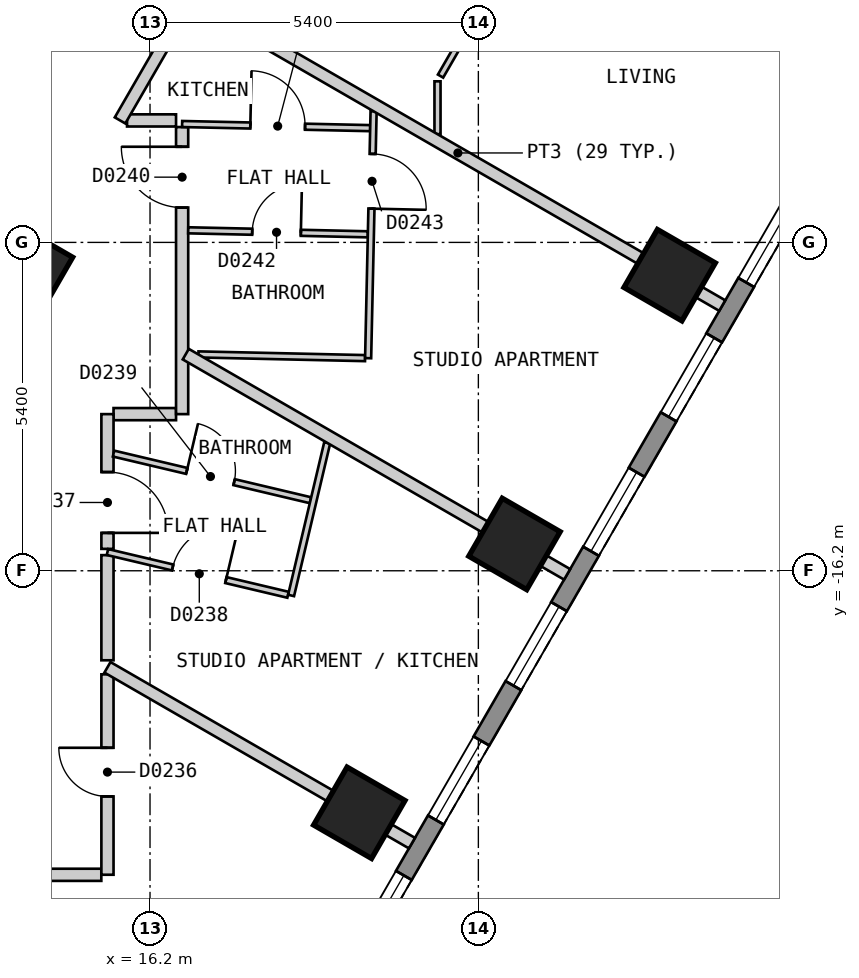
"""IFC4 building model, lengths in metres.
Left out: names, types, materials, properties, quantities, classifications, styles, units other than length and angle.
Written with IfcOpenShell. Run it as: python <this file> out.ifc"""

import sys

from ifc_helpers import new_model, si_unit, direction, frame, frame_2d, origin, origin_2d, place, context, subcontext, project, spatial, polyline, rectangle, outline, extrude, element, fill, save


model = new_model("IFC4")
c1 = context("Model", 3, precision=1e-05, world=origin(), true_north=direction((0.0, 1.0)))
c2 = subcontext(c1, "Body", "Model", "MODEL_VIEW")
j1 = project(units=[si_unit("LENGTHUNIT", "METRE"), si_unit("PLANEANGLEUNIT", "RADIAN")], contexts=[c1])
p1 = place(None, origin())
s1 = spatial("IfcSite", under=j1, at=p1, CompositionType="ELEMENT")
p2 = place(p1, origin())
s2 = spatial("IfcBuilding", under=s1, at=p2, CompositionType="ELEMENT")
p3 = place(p2, frame((0.0, 0.0, 41.4)))
s3 = spatial("IfcBuildingStorey", under=s2, at=p3, CompositionType="ELEMENT", Elevation=41.4)
for number, where, z_axis, x_axis in (
    (1, (19.642, -20.18, 0.0), (0.0, 0.0, 1.0), (0.5, 0.866, 0.0)),
    (2, (22.194, -15.759, 0.0), (0.0, 0.0, 1.0), (0.5, 0.866, 0.0)),
    (3, (24.746, -11.339, 0.0), (0.0, 0.0, 1.0), (0.5, 0.866, 0.0)),
):
    element("IfcColumn", number, at=place(p3, frame(where, z_axis=z_axis, x_axis=x_axis)), inside=s3, PredefinedType="COLUMN", context=c2, shape_type="SweptSolid", body=[
        extrude(rectangle(XDim=1.1, YDim=1.1, at=origin_2d()), origin(), (0.0, 0.0, 1.0), 3.0),
    ])
p4 = place(p3, frame((14.313, -11.209, 0.0), z_axis=(0.0, 0.0, 1.0), x_axis=(0.499984884929, 0.866034130299, 0.0)))
e4 = element("IfcColumn", 4, at=p4, inside=s3, PredefinedType="COLUMN", context=c2, shape_type="SweptSolid", body=[
    extrude(rectangle(XDim=0.9, YDim=0.9, at=origin_2d()), origin(), (0.0, 0.0, 1.0), 3.0),
])
p5 = place(p3, frame((17.71, -25.825, 0.0), z_axis=(0.0, 0.0, 1.0), x_axis=(0.500001938803, 0.866024284413, 0.0)))
e5 = element("IfcWall", 5, at=p5, inside=s3, PredefinedType="SOLIDWALL", context=c2, shape_type="SweptSolid", body=[
    extrude(outline(polyline([(0.0, -0.15), (27.02, -0.15), (26.94, 0.15), (0.08, 0.15), (0.0, -0.15)])), origin(), (0.0, 0.0, 1.0), 2.7),
])
p6 = place(p5, frame((1.277, 0.0, 0.15)))
e6 = element("IfcOpeningElement", 6, at=p6, cuts=e5, PredefinedType="OPENING", context=c2, shape_type="SweptSolid", body=[
    extrude(rectangle(XDim=1.5, YDim=2.1, at=frame_2d((0.75, 1.05))), frame((0.0, 0.16, 0.0), z_axis=(0.0, -1.0, 0.0), x_axis=(1.0, 0.0, 0.0)), (0.0, 0.0, 1.0), 0.32),
])
p7 = place(p5, frame((3.829, 0.0, 0.15)))
e7 = element("IfcOpeningElement", 7, at=p7, cuts=e5, PredefinedType="OPENING", context=c2, shape_type="SweptSolid", body=[
    extrude(rectangle(XDim=1.5, YDim=2.1, at=frame_2d((0.75, 1.05))), frame((0.0, 0.16, 0.0), z_axis=(0.0, -1.0, 0.0), x_axis=(1.0, 0.0, 0.0)), (0.0, 0.0, 1.0), 0.32),
])
p8 = place(p5, frame((6.382, 0.0, 0.15)))
e8 = element("IfcOpeningElement", 8, at=p8, cuts=e5, PredefinedType="OPENING", context=c2, shape_type="SweptSolid", body=[
    extrude(rectangle(XDim=1.5, YDim=2.1, at=frame_2d((0.75, 1.05))), frame((0.0, 0.16, 0.0), z_axis=(0.0, -1.0, 0.0), x_axis=(1.0, 0.0, 0.0)), (0.0, 0.0, 1.0), 0.32),
])
p9 = place(p5, frame((8.933, 0.0, 0.15)))
e9 = element("IfcOpeningElement", 9, at=p9, cuts=e5, PredefinedType="OPENING", context=c2, shape_type="SweptSolid", body=[
    extrude(rectangle(XDim=1.5, YDim=2.1, at=frame_2d((0.75, 1.05))), frame((0.0, 0.16, 0.0), z_axis=(0.0, -1.0, 0.0), x_axis=(1.0, 0.0, 0.0)), (0.0, 0.0, 1.0), 0.32),
])
p10 = place(p5, frame((11.485, 0.0, 0.15)))
e10 = element("IfcOpeningElement", 10, at=p10, cuts=e5, PredefinedType="OPENING", context=c2, shape_type="SweptSolid", body=[
    extrude(rectangle(XDim=1.5, YDim=2.1, at=frame_2d((0.75, 1.05))), frame((0.0, 0.16, 0.0), z_axis=(0.0, -1.0, 0.0), x_axis=(1.0, 0.0, 0.0)), (0.0, 0.0, 1.0), 0.32),
])
p11 = place(p5, frame((14.037, 0.0, 0.15)))
e11 = element("IfcOpeningElement", 11, at=p11, cuts=e5, PredefinedType="OPENING", context=c2, shape_type="SweptSolid", body=[
    extrude(rectangle(XDim=1.5, YDim=2.1, at=frame_2d((0.75, 1.05))), frame((0.0, 0.16, 0.0), z_axis=(0.0, -1.0, 0.0), x_axis=(1.0, 0.0, 0.0)), (0.0, 0.0, 1.0), 0.32),
])
p12 = place(p5, frame((16.589, 0.0, 0.15)))
e12 = element("IfcOpeningElement", 12, at=p12, cuts=e5, PredefinedType="OPENING", context=c2, shape_type="SweptSolid", body=[
    extrude(rectangle(XDim=1.5, YDim=2.1, at=frame_2d((0.75, 1.05))), frame((0.0, 0.16, 0.0), z_axis=(0.0, -1.0, 0.0), x_axis=(1.0, 0.0, 0.0)), (0.0, 0.0, 1.0), 0.32),
])
p13 = place(p5, frame((19.141, 0.0, 0.15)))
e13 = element("IfcOpeningElement", 13, at=p13, cuts=e5, PredefinedType="OPENING", context=c2, shape_type="SweptSolid", body=[
    extrude(rectangle(XDim=1.5, YDim=2.1, at=frame_2d((0.75, 1.05))), frame((0.0, 0.16, 0.0), z_axis=(0.0, -1.0, 0.0), x_axis=(1.0, 0.0, 0.0)), (0.0, 0.0, 1.0), 0.32),
])
p14 = place(p5, frame((21.693, 0.0, 0.15)))
e14 = element("IfcOpeningElement", 14, at=p14, cuts=e5, PredefinedType="OPENING", context=c2, shape_type="SweptSolid", body=[
    extrude(rectangle(XDim=1.5, YDim=2.1, at=frame_2d((0.75, 1.05))), frame((0.0, 0.16, 0.0), z_axis=(0.0, -1.0, 0.0), x_axis=(1.0, 0.0, 0.0)), (0.0, 0.0, 1.0), 0.32),
])
p15 = place(p5, frame((24.244, 0.0, 0.15)))
e15 = element("IfcOpeningElement", 15, at=p15, cuts=e5, PredefinedType="OPENING", context=c2, shape_type="SweptSolid", body=[
    extrude(rectangle(XDim=1.5, YDim=2.1, at=frame_2d((0.75, 1.05))), frame((0.0, 0.16, 0.0), z_axis=(0.0, -1.0, 0.0), x_axis=(1.0, 0.0, 0.0)), (0.0, 0.0, 1.0), 0.32),
])
p16 = place(p3, frame((15.5, -15.943, 0.0), z_axis=(0.0, 0.0, 1.0), x_axis=(0.0, -1.0, 0.0)))
e16 = element("IfcWall", 16, at=p16, inside=s3, PredefinedType="PARTITIONING", context=c2, shape_type="SweptSolid", body=[
    extrude(rectangle(XDim=1.729, YDim=0.2, at=frame_2d((0.865, 0.0))), origin(), (0.0, 0.0, 1.0), 2.7),
])
p17 = place(p3, frame((15.822, -8.794, 0.0), z_axis=(0.0, 0.0, 1.0), x_axis=(1.0, 0.0, 0.0)))
e17 = element("IfcWall", 17, at=p17, inside=s3, PredefinedType="PARTITIONING", context=c2, shape_type="SweptSolid", body=[
    extrude(rectangle(XDim=0.806, YDim=0.2, at=frame_2d((0.403, 0.0))), origin(), (0.0, 0.0, 1.0), 2.7),
])
p18 = place(p3, frame((15.6, -13.624, 0.0), z_axis=(0.0, 0.0, 1.0), x_axis=(1.0, 0.0, 0.0)))
e18 = element("IfcWall", 18, at=p18, inside=s3, PredefinedType="PARTITIONING", context=c2, shape_type="SweptSolid", body=[
    extrude(rectangle(XDim=1.028, YDim=0.2, at=frame_2d((0.514, 0.0))), origin(), (0.0, 0.0, 1.0), 2.7),
])
p19 = place(p3, frame((-15.499, -21.2, 0.0), z_axis=(0.0, 0.0, 1.0), x_axis=(1.0, 0.0, 0.0)))
e19 = element("IfcWall", 19, at=p19, inside=s3, PredefinedType="PARTITIONING", context=c2, shape_type="SweptSolid", body=[
    extrude(rectangle(XDim=30.898, YDim=0.2, at=frame_2d((15.449, 0.0))), origin(), (0.0, 0.0, 1.0), 2.7),
])
p20 = place(p19, frame((5.084, 0.0, 0.0)))
e20 = element("IfcOpeningElement", 20, at=p20, cuts=e19, PredefinedType="OPENING", context=c2, shape_type="SweptSolid", body=[
    extrude(rectangle(XDim=0.9, YDim=2.1, at=frame_2d((0.45, 1.05))), frame((0.0, 0.11, 0.0), z_axis=(0.0, -1.0, 0.0), x_axis=(1.0, 0.0, 0.0)), (0.0, 0.0, 1.0), 0.22),
])
p21 = place(p19, frame((15.0, 0.0, 0.0)))
e21 = element("IfcOpeningElement", 21, at=p21, cuts=e19, PredefinedType="OPENING", context=c2, shape_type="SweptSolid", body=[
    extrude(rectangle(XDim=1.0, YDim=2.1, at=frame_2d((0.5, 1.05))), frame((0.0, 0.11, 0.0), z_axis=(0.0, -1.0, 0.0), x_axis=(1.0, 0.0, 0.0)), (0.0, 0.0, 1.0), 0.22),
])
p22 = place(p19, frame((25.015, 0.0, 0.0)))
e22 = element("IfcOpeningElement", 22, at=p22, cuts=e19, PredefinedType="OPENING", context=c2, shape_type="SweptSolid", body=[
    extrude(rectangle(XDim=0.9, YDim=2.1, at=frame_2d((0.45, 1.05))), frame((0.0, 0.11, 0.0), z_axis=(0.0, -1.0, 0.0), x_axis=(1.0, 0.0, 0.0)), (0.0, 0.0, 1.0), 0.22),
])
p23 = place(p3, frame((15.707, -8.794, 0.0), z_axis=(0.0, 0.0, 1.0), x_axis=(0.500040469623, 0.866002037376, 0.0)))
e23 = element("IfcWall", 23, at=p23, inside=s3, PredefinedType="PARTITIONING", context=c2, shape_type="SweptSolid", body=[
    extrude(rectangle(XDim=2.281, YDim=0.2, at=frame_2d((1.141, 0.0))), origin(), (0.0, 0.0, 1.0), 2.7),
])
p24 = place(p3, frame((15.5, -21.199, 0.0), z_axis=(0.0, 0.0, 1.0), x_axis=(0.0, 1.0, 0.0)))
e24 = element("IfcWall", 24, at=p24, inside=s3, PredefinedType="PARTITIONING", context=c2, shape_type="SweptSolid", body=[
    extrude(rectangle(XDim=3.296, YDim=0.2, at=frame_2d((1.648, 0.0))), origin(), (0.0, 0.0, 1.0), 2.7),
])
p25 = place(p24, frame((1.288, 0.0, 0.0)))
e25 = element("IfcOpeningElement", 25, at=p25, cuts=e24, PredefinedType="OPENING", context=c2, shape_type="SweptSolid", body=[
    extrude(rectangle(XDim=0.8, YDim=2.1, at=frame_2d((0.4, 1.05))), frame((0.0, 0.11, 0.0), z_axis=(0.0, -1.0, 0.0), x_axis=(1.0, 0.0, 0.0)), (0.0, 0.0, 1.0), 0.22),
])
p26 = place(p3, frame((15.5, -15.84, 0.0), z_axis=(0.0, 0.0, 1.0), x_axis=(0.0, 1.0, 0.0)))
e26 = element("IfcWall", 26, at=p26, inside=s3, PredefinedType="PARTITIONING", context=c2, shape_type="SweptSolid", body=[
    extrude(rectangle(XDim=2.216, YDim=0.2, at=frame_2d((1.108, 0.0))), origin(), (0.0, 0.0, 1.0), 2.7),
])
p27 = place(p26, frame((0.263, 0.0, 0.0)))
e27 = element("IfcOpeningElement", 27, at=p27, cuts=e26, PredefinedType="OPENING", context=c2, shape_type="SweptSolid", body=[
    extrude(rectangle(XDim=1.0, YDim=2.1, at=frame_2d((0.5, 1.05))), frame((0.0, 0.11, 0.0), z_axis=(0.0, -1.0, 0.0), x_axis=(1.0, 0.0, 0.0)), (0.0, 0.0, 1.0), 0.22),
])
p28 = place(p3, frame((16.728, -13.624, 0.0), z_axis=(0.0, 0.0, 1.0), x_axis=(0.0, 1.0, 0.0)))
e28 = element("IfcWall", 28, at=p28, inside=s3, PredefinedType="PARTITIONING", context=c2, shape_type="SweptSolid", body=[
    extrude(rectangle(XDim=4.721, YDim=0.2, at=frame_2d((2.36, 0.0))), origin(), (0.0, 0.0, 1.0), 2.7),
])
p29 = place(p28, frame((3.397, 0.0, 0.0)))
e29 = element("IfcOpeningElement", 29, at=p29, cuts=e28, PredefinedType="OPENING", context=c2, shape_type="SweptSolid", body=[
    extrude(rectangle(XDim=1.0, YDim=2.1, at=frame_2d((0.5, 1.05))), frame((0.0, 0.11, 0.0), z_axis=(0.0, -1.0, 0.0), x_axis=(1.0, 0.0, 0.0)), (0.0, 0.0, 1.0), 0.22),
])
p30 = place(p3, frame((15.6, -14.273, 0.0), z_axis=(0.0, 0.0, 1.0), x_axis=(0.973083317443, -0.230453590368, 0.0)))
e30 = element("IfcWall", 30, at=p30, inside=s3, PredefinedType="PARTITIONING", context=c2, shape_type="SweptSolid", body=[
    extrude(rectangle(XDim=3.329, YDim=0.1, at=frame_2d((1.664, 0.0))), origin(), (0.0, 0.0, 1.0), 2.7),
])
p31 = place(p30, frame((1.238, 0.0, 0.0)))
e31 = element("IfcOpeningElement", 31, at=p31, cuts=e30, PredefinedType="OPENING", context=c2, shape_type="SweptSolid", body=[
    extrude(rectangle(XDim=0.8, YDim=2.1, at=frame_2d((0.4, 1.05))), frame((0.0, 0.06, 0.0), z_axis=(0.0, -1.0, 0.0), x_axis=(1.0, 0.0, 0.0)), (0.0, 0.0, 1.0), 0.12),
])
p32 = place(p3, frame((15.5, -15.892, 0.0), z_axis=(0.0, 0.0, 1.0), x_axis=(0.973119457068, -0.230300938504, 0.0)))
e32 = element("IfcWall", 32, at=p32, inside=s3, PredefinedType="PARTITIONING", context=c2, shape_type="SweptSolid", body=[
    extrude(rectangle(XDim=3.052, YDim=0.1, at=frame_2d((1.526, 0.0))), origin(), (0.0, 0.0, 1.0), 2.7),
])
p33 = place(p32, frame((1.102, 0.0, 0.0)))
e33 = element("IfcOpeningElement", 33, at=p33, cuts=e32, PredefinedType="OPENING", context=c2, shape_type="SweptSolid", body=[
    extrude(rectangle(XDim=0.9, YDim=2.1, at=frame_2d((0.45, 1.05))), frame((0.0, 0.06, 0.0), z_axis=(0.0, -1.0, 0.0), x_axis=(1.0, 0.0, 0.0)), (0.0, 0.0, 1.0), 0.12),
])
p34 = place(p3, frame((16.728, -8.853, 0.0), z_axis=(0.0, 0.0, 1.0), x_axis=(0.999759332126, -0.021938045176, 0.0)))
e34 = element("IfcWall", 34, at=p34, inside=s3, PredefinedType="PARTITIONING", context=c2, shape_type="SweptSolid", body=[
    extrude(rectangle(XDim=3.094, YDim=0.1, at=frame_2d((1.547, 0.0))), origin(), (0.0, 0.0, 1.0), 2.7),
])
p35 = place(p34, frame((1.122, 0.0, 0.0)))
e35 = element("IfcOpeningElement", 35, at=p35, cuts=e34, PredefinedType="OPENING", context=c2, shape_type="SweptSolid", body=[
    extrude(rectangle(XDim=0.9, YDim=2.1, at=frame_2d((0.45, 1.05))), frame((0.0, 0.06, 0.0), z_axis=(0.0, -1.0, 0.0), x_axis=(1.0, 0.0, 0.0)), (0.0, 0.0, 1.0), 0.12),
])
p36 = place(p3, frame((16.828, -10.601, 0.0), z_axis=(0.0, 0.0, 1.0), x_axis=(0.999751134527, -0.02230849639, 0.0)))
e36 = element("IfcWall", 36, at=p36, inside=s3, PredefinedType="PARTITIONING", context=c2, shape_type="SweptSolid", body=[
    extrude(rectangle(XDim=2.955, YDim=0.1, at=frame_2d((1.478, 0.0))), origin(), (0.0, 0.0, 1.0), 2.7),
])
p37 = place(p36, frame((1.053, 0.0, 0.0)))
e37 = element("IfcOpeningElement", 37, at=p37, cuts=e36, PredefinedType="OPENING", context=c2, shape_type="SweptSolid", body=[
    extrude(rectangle(XDim=0.8, YDim=2.1, at=frame_2d((0.4, 1.05))), frame((0.0, 0.06, 0.0), z_axis=(0.0, -1.0, 0.0), x_axis=(1.0, 0.0, 0.0)), (0.0, 0.0, 1.0), 0.12),
])
p38 = place(p3, frame((16.996, -12.642, 0.0), z_axis=(0.0, 0.0, 1.0), x_axis=(0.999754143854, -0.022173223641, 0.0)))
e38 = element("IfcWall", 38, at=p38, inside=s3, PredefinedType="PARTITIONING", context=c2, shape_type="SweptSolid", body=[
    extrude(rectangle(XDim=2.742, YDim=0.1, at=frame_2d((1.371, 0.0))), origin(), (0.0, 0.0, 1.0), 2.7),
])
p39 = place(p3, frame((20.978, -8.065, 0.0), z_axis=(0.0, 0.0, 1.0), x_axis=(0.499965068118, 0.866045570776, 0.0)))
e39 = element("IfcWall", 39, at=p39, inside=s3, PredefinedType="PARTITIONING", context=c2, shape_type="SweptSolid", body=[
    extrude(rectangle(XDim=4.152, YDim=0.1, at=frame_2d((2.076, 0.0))), origin(), (0.0, 0.0, 1.0), 2.7),
])
p40 = place(p39, frame((1.15, 0.0, 0.0)))
e40 = element("IfcOpeningElement", 40, at=p40, cuts=e39, PredefinedType="OPENING", context=c2, shape_type="SweptSolid", body=[
    extrude(rectangle(XDim=0.9, YDim=2.1, at=frame_2d((0.45, 1.05))), frame((0.0, 0.06, 0.0), z_axis=(0.0, -1.0, 0.0), x_axis=(1.0, 0.0, 0.0)), (0.0, 0.0, 1.0), 0.12),
])
p41 = place(p3, frame((18.52, -16.606, 0.0), z_axis=(0.0, 0.0, 1.0), x_axis=(0.230289488548, 0.973122166773, 0.0)))
e41 = element("IfcWall", 41, at=p41, inside=s3, PredefinedType="PARTITIONING", context=c2, shape_type="SweptSolid", body=[
    extrude(rectangle(XDim=2.579, YDim=0.1, at=frame_2d((1.29, 0.0))), origin(), (0.0, 0.0, 1.0), 2.7),
])
p42 = place(p3, frame((19.787, -12.704, 0.0), z_axis=(0.0, 0.0, 1.0), x_axis=(0.02212326712, 0.999755250575, 0.0)))
e42 = element("IfcWall", 42, at=p42, inside=s3, PredefinedType="PARTITIONING", context=c2, shape_type="SweptSolid", body=[
    extrude(rectangle(XDim=4.061, YDim=0.1, at=frame_2d((2.031, 0.0))), origin(), (0.0, 0.0, 1.0), 2.7),
])
p43 = place(p42, frame((2.46, 0.0, 0.0)))
e43 = element("IfcOpeningElement", 43, at=p43, cuts=e42, PredefinedType="OPENING", context=c2, shape_type="SweptSolid", body=[
    extrude(rectangle(XDim=0.9, YDim=2.1, at=frame_2d((0.45, 1.05))), frame((0.0, 0.06, 0.0), z_axis=(0.0, -1.0, 0.0), x_axis=(1.0, 0.0, 0.0)), (0.0, 0.0, 1.0), 0.12),
])
p44 = place(p3, frame((20.928, -9.02, 0.0), z_axis=(0.0, 0.0, 1.0), x_axis=(0.0, 1.0, 0.0)))
e44 = element("IfcWall", 44, at=p44, inside=s3, PredefinedType="PARTITIONING", context=c2, shape_type="SweptSolid", body=[
    extrude(rectangle(XDim=0.869, YDim=0.1, at=frame_2d((0.435, 0.0))), origin(), (0.0, 0.0, 1.0), 2.7),
])
p45 = place(p3, frame((12.297, -21.3, 0.0), z_axis=(0.0, 0.0, 1.0), x_axis=(0.500056399578, -0.865992839024, 0.0)))
e45 = element("IfcWall", 45, at=p45, inside=s3, PredefinedType="PARTITIONING", context=c2, shape_type="SweptSolid", body=[
    extrude(rectangle(XDim=6.455, YDim=0.2, at=frame_2d((3.228, 0.0))), origin(), (0.0, 0.0, 1.0), 2.7),
])
p46 = place(p3, frame((15.5, -17.788, 0.0), z_axis=(0.0, 0.0, 1.0), x_axis=(0.866065366639, -0.499930775916, 0.0)))
e46 = element("IfcWall", 46, at=p46, inside=s3, PredefinedType="PARTITIONING", context=c2, shape_type="SweptSolid", body=[
    extrude(rectangle(XDim=5.782, YDim=0.2, at=frame_2d((2.891, 0.0))), origin(), (0.0, 0.0, 1.0), 2.7),
])
p47 = place(p3, frame((16.788, -12.638, 0.0), z_axis=(0.0, 0.0, 1.0), x_axis=(0.866027278279, -0.499996753267, 0.0)))
e47 = element("IfcWall", 47, at=p47, inside=s3, PredefinedType="PARTITIONING", context=c2, shape_type="SweptSolid", body=[
    extrude(rectangle(XDim=7.242, YDim=0.2, at=frame_2d((3.621, 0.0))), origin(), (0.0, 0.0, 1.0), 2.7),
])
p48 = place(p3, frame((16.916, -6.819, 0.0), z_axis=(0.0, 0.0, 1.0), x_axis=(0.866028876723, -0.499993984646, 0.0)))
e48 = element("IfcWall", 48, at=p48, inside=s3, PredefinedType="PARTITIONING", context=c2, shape_type="SweptSolid", body=[
    extrude(rectangle(XDim=10.04, YDim=0.2, at=frame_2d((5.02, 0.0))), origin(), (0.0, 0.0, 1.0), 2.7),
])
p49 = place(p7, origin())
e49 = element("IfcWindow", 49, at=p49, inside=s3, PartitioningType="SINGLE_PANEL", PredefinedType="WINDOW", context=c2, shape_type="SweptSolid", body=[
    extrude(rectangle(XDim=1.5, YDim=2.1, at=frame_2d((0.75, 1.05))), frame((0.0, 0.03, 0.0), z_axis=(0.0, -1.0, 0.0), x_axis=(1.0, 0.0, 0.0)), (0.0, 0.0, 1.0), 0.06),
])
fill(e7, e49)
p50 = place(p8, origin())
e50 = element("IfcWindow", 50, at=p50, inside=s3, PartitioningType="SINGLE_PANEL", PredefinedType="WINDOW", context=c2, shape_type="SweptSolid", body=[
    extrude(rectangle(XDim=1.5, YDim=2.1, at=frame_2d((0.75, 1.05))), frame((0.0, 0.03, 0.0), z_axis=(0.0, -1.0, 0.0), x_axis=(1.0, 0.0, 0.0)), (0.0, 0.0, 1.0), 0.06),
])
fill(e8, e50)
p51 = place(p9, origin())
e51 = element("IfcWindow", 51, at=p51, inside=s3, PartitioningType="SINGLE_PANEL", PredefinedType="WINDOW", context=c2, shape_type="SweptSolid", body=[
    extrude(rectangle(XDim=1.5, YDim=2.1, at=frame_2d((0.75, 1.05))), frame((0.0, 0.03, 0.0), z_axis=(0.0, -1.0, 0.0), x_axis=(1.0, 0.0, 0.0)), (0.0, 0.0, 1.0), 0.06),
])
fill(e9, e51)
p52 = place(p10, origin())
e52 = element("IfcWindow", 52, at=p52, inside=s3, PartitioningType="SINGLE_PANEL", PredefinedType="WINDOW", context=c2, shape_type="SweptSolid", body=[
    extrude(rectangle(XDim=1.5, YDim=2.1, at=frame_2d((0.75, 1.05))), frame((0.0, 0.03, 0.0), z_axis=(0.0, -1.0, 0.0), x_axis=(1.0, 0.0, 0.0)), (0.0, 0.0, 1.0), 0.06),
])
fill(e10, e52)
p53 = place(p11, origin())
e53 = element("IfcWindow", 53, at=p53, inside=s3, PartitioningType="SINGLE_PANEL", PredefinedType="WINDOW", context=c2, shape_type="SweptSolid", body=[
    extrude(rectangle(XDim=1.5, YDim=2.1, at=frame_2d((0.75, 1.05))), frame((0.0, 0.03, 0.0), z_axis=(0.0, -1.0, 0.0), x_axis=(1.0, 0.0, 0.0)), (0.0, 0.0, 1.0), 0.06),
])
fill(e11, e53)
p54 = place(p12, origin())
e54 = element("IfcWindow", 54, at=p54, inside=s3, PartitioningType="SINGLE_PANEL", PredefinedType="WINDOW", context=c2, shape_type="SweptSolid", body=[
    extrude(rectangle(XDim=1.5, YDim=2.1, at=frame_2d((0.75, 1.05))), frame((0.0, 0.03, 0.0), z_axis=(0.0, -1.0, 0.0), x_axis=(1.0, 0.0, 0.0)), (0.0, 0.0, 1.0), 0.06),
])
fill(e12, e54)
p55 = place(p25, origin())
e55 = element("IfcDoor", 55, at=p55, inside=s3, OperationType="SINGLE_SWING_RIGHT", PredefinedType="DOOR", context=c2, shape_type="SweptSolid", body=[
    extrude(rectangle(XDim=0.8, YDim=2.1, at=frame_2d((0.4, 1.05))), frame((0.0, 0.025, 0.0), z_axis=(0.0, -1.0, 0.0), x_axis=(1.0, 0.0, 0.0)), (0.0, 0.0, 1.0), 0.05),
])
fill(e25, e55)
p56 = place(p27, origin())
e56 = element("IfcDoor", 56, at=p56, inside=s3, OperationType="SINGLE_SWING_LEFT", PredefinedType="DOOR", context=c2, shape_type="SweptSolid", body=[
    extrude(rectangle(XDim=1.0, YDim=2.1, at=frame_2d((0.5, 1.05))), frame((0.0, 0.025, 0.0), z_axis=(0.0, -1.0, 0.0), x_axis=(1.0, 0.0, 0.0)), (0.0, 0.0, 1.0), 0.05),
])
fill(e27, e56)
p57 = place(p33, origin())
e57 = element("IfcDoor", 57, at=p57, inside=s3, OperationType="SINGLE_SWING_RIGHT", PredefinedType="DOOR", context=c2, shape_type="SweptSolid", body=[
    extrude(rectangle(XDim=0.9, YDim=2.1, at=frame_2d((0.45, 1.05))), frame((0.0, 0.025, 0.0), z_axis=(0.0, -1.0, 0.0), x_axis=(1.0, 0.0, 0.0)), (0.0, 0.0, 1.0), 0.05),
])
fill(e33, e57)
p58 = place(p31, origin())
e58 = element("IfcDoor", 58, at=p58, inside=s3, OperationType="SINGLE_SWING_LEFT", PredefinedType="DOOR", context=c2, shape_type="SweptSolid", body=[
    extrude(rectangle(XDim=0.8, YDim=2.1, at=frame_2d((0.4, 1.05))), frame((0.0, 0.025, 0.0), z_axis=(0.0, -1.0, 0.0), x_axis=(1.0, 0.0, 0.0)), (0.0, 0.0, 1.0), 0.05),
])
fill(e31, e58)
p59 = place(p29, origin())
e59 = element("IfcDoor", 59, at=p59, inside=s3, OperationType="SINGLE_SWING_RIGHT", PredefinedType="DOOR", context=c2, shape_type="SweptSolid", body=[
    extrude(rectangle(XDim=1.0, YDim=2.1, at=frame_2d((0.5, 1.05))), frame((0.0, 0.025, 0.0), z_axis=(0.0, -1.0, 0.0), x_axis=(1.0, 0.0, 0.0)), (0.0, 0.0, 1.0), 0.05),
])
fill(e29, e59)
p60 = place(p35, origin())
e60 = element("IfcDoor", 60, at=p60, inside=s3, OperationType="SINGLE_SWING_LEFT", PredefinedType="DOOR", context=c2, shape_type="SweptSolid", body=[
    extrude(rectangle(XDim=0.9, YDim=2.1, at=frame_2d((0.45, 1.05))), frame((0.0, 0.025, 0.0), z_axis=(0.0, -1.0, 0.0), x_axis=(1.0, 0.0, 0.0)), (0.0, 0.0, 1.0), 0.05),
])
fill(e35, e60)
p61 = place(p37, origin())
e61 = element("IfcDoor", 61, at=p61, inside=s3, OperationType="SINGLE_SWING_RIGHT", PredefinedType="DOOR", context=c2, shape_type="SweptSolid", body=[
    extrude(rectangle(XDim=0.8, YDim=2.1, at=frame_2d((0.4, 1.05))), frame((0.0, 0.025, 0.0), z_axis=(0.0, -1.0, 0.0), x_axis=(1.0, 0.0, 0.0)), (0.0, 0.0, 1.0), 0.05),
])
fill(e37, e61)
p62 = place(p43, origin())
e62 = element("IfcDoor", 62, at=p62, inside=s3, OperationType="SINGLE_SWING_LEFT", PredefinedType="DOOR", context=c2, shape_type="SweptSolid", body=[
    extrude(rectangle(XDim=0.9, YDim=2.1, at=frame_2d((0.45, 1.05))), frame((0.0, 0.025, 0.0), z_axis=(0.0, -1.0, 0.0), x_axis=(1.0, 0.0, 0.0)), (0.0, 0.0, 1.0), 0.05),
])
fill(e43, e62)
save(model, sys.argv[1])
